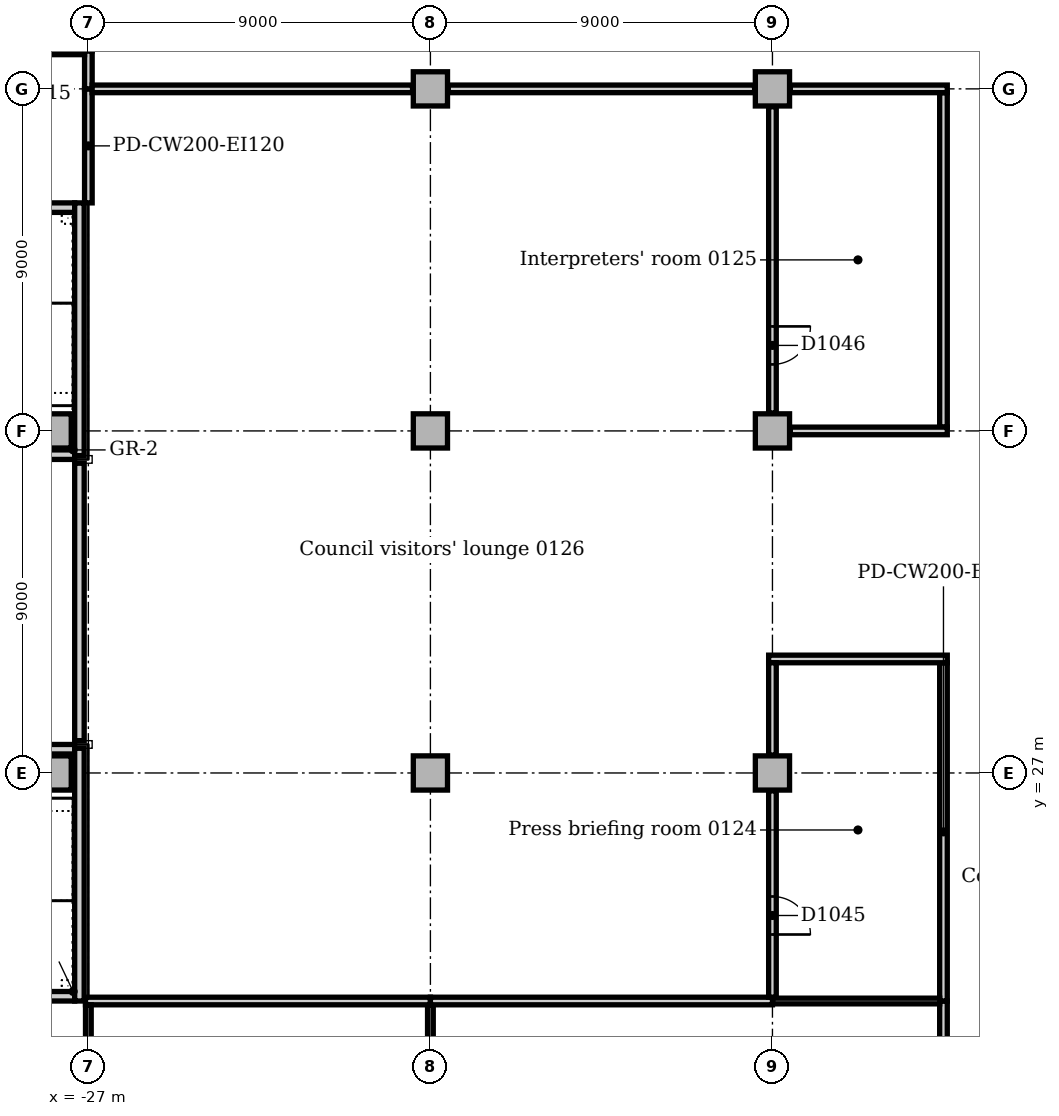
"""IFC4 building model, lengths in metres.
Left out: names, types, materials, properties, quantities, classifications, styles, units other than length and angle.
Written with IfcOpenShell. Run it as: python <this file> out.ifc"""

import sys

from ifc_helpers import new_model, si_unit, direction, frame, frame_2d, origin, origin_2d, place, context, subcontext, project, spatial, rectangle, extrude, element, fill, save


model = new_model("IFC4")
c1 = context("Model", 3, precision=1e-05, world=origin(), true_north=direction((0.0, 1.0)))
c2 = subcontext(c1, "Body", "Model", "MODEL_VIEW")
j1 = project(units=[si_unit("LENGTHUNIT", "METRE"), si_unit("PLANEANGLEUNIT", "RADIAN")], contexts=[c1])
p1 = place(None, origin())
s1 = spatial("IfcSite", under=j1, at=p1, CompositionType="ELEMENT")
p2 = place(p1, origin())
s2 = spatial("IfcBuilding", under=s1, at=p2, CompositionType="ELEMENT")
p3 = place(p2, frame((0.0, 0.0, 6.0)))
s3 = spatial("IfcBuildingStorey", under=s2, at=p3, CompositionType="ELEMENT", Elevation=6.0)
p4 = place(p3, frame((-30.9, 21.125, 0.0), z_axis=(0.0, 0.0, 1.0), x_axis=(1.0, 0.0, 0.0)))
e1 = element("IfcWall", 1, at=p4, inside=s3, PredefinedType="SOLIDWALL", context=c2, shape_type="SweptSolid", body=[
    extrude(rectangle(XDim=3.54, YDim=0.25, at=frame_2d((1.77, 0.0))), origin(), (0.0, 0.0, 1.0), 5.0),
])
p5 = place(p3, frame((-27.36, 27.625, 0.0), z_axis=(0.0, 0.0, 1.0), x_axis=(-1.0, 0.0, 0.0)))
e2 = element("IfcWall", 2, at=p5, inside=s3, PredefinedType="SOLIDWALL", context=c2, shape_type="SweptSolid", body=[
    extrude(rectangle(XDim=3.54, YDim=0.25, at=frame_2d((1.77, 0.0))), origin(), (0.0, 0.0, 1.0), 5.0),
])
p6 = place(p5, frame((1.69, 0.0, 0.0)))
e3 = element("IfcOpeningElement", 3, at=p6, cuts=e2, PredefinedType="OPENING", context=c2, shape_type="SweptSolid", body=[
    extrude(rectangle(XDim=1.1, YDim=2.1, at=frame_2d((0.55, 1.05))), frame((0.0, 0.135, 0.0), z_axis=(0.0, -1.0, 0.0), x_axis=(1.0, 0.0, 0.0)), (0.0, 0.0, 1.0), 0.27),
])
p7 = place(p3, frame((-30.9, 35.375, 0.0), z_axis=(0.0, 0.0, 1.0), x_axis=(1.0, 0.0, 0.0)))
e4 = element("IfcWall", 4, at=p7, inside=s3, PredefinedType="SOLIDWALL", context=c2, shape_type="SweptSolid", body=[
    extrude(rectangle(XDim=3.54, YDim=0.25, at=frame_2d((1.77, 0.0))), origin(), (0.0, 0.0, 1.0), 5.0),
])
p8 = place(p7, frame((0.75, 0.0, 0.0)))
e5 = element("IfcOpeningElement", 5, at=p8, cuts=e4, PredefinedType="OPENING", context=c2, shape_type="SweptSolid", body=[
    extrude(rectangle(XDim=1.1, YDim=2.1, at=frame_2d((0.55, 1.05))), frame((0.0, 0.135, 0.0), z_axis=(0.0, -1.0, 0.0), x_axis=(1.0, 0.0, 0.0)), (0.0, 0.0, 1.0), 0.27),
])
p9 = place(p3, frame((-27.36, 41.875, 0.0), z_axis=(0.0, 0.0, 1.0), x_axis=(-1.0, 0.0, 0.0)))
e6 = element("IfcWall", 6, at=p9, inside=s3, PredefinedType="SOLIDWALL", context=c2, shape_type="SweptSolid", body=[
    extrude(rectangle(XDim=3.54, YDim=0.25, at=frame_2d((1.77, 0.0))), origin(), (0.0, 0.0, 1.0), 5.0),
])
p10 = place(p3, frame((-27.235, 21.0, 0.0), z_axis=(0.0, 0.0, 1.0), x_axis=(0.0, 1.0, 0.0)))
e7 = element("IfcWall", 7, at=p10, inside=s3, PredefinedType="SOLIDWALL", context=c2, shape_type="SweptSolid", body=[
    extrude(rectangle(XDim=6.65, YDim=0.25, at=frame_2d((3.325, 0.0))), origin(), (0.0, 0.0, 1.0), 5.0),
])
p11 = place(p3, frame((-27.235, 27.85, 0.0), z_axis=(0.0, 0.0, 1.0), x_axis=(0.0, 1.0, 0.0)))
e8 = element("IfcWall", 8, at=p11, inside=s3, PredefinedType="SOLIDWALL", context=c2, shape_type="SweptSolid", body=[
    extrude(rectangle(XDim=7.3, YDim=0.25, at=frame_2d((3.65, 0.0))), origin(), (0.0, 0.0, 1.0), 5.0),
])
p12 = place(p3, frame((-27.235, 35.35, 0.0), z_axis=(0.0, 0.0, 1.0), x_axis=(0.0, 1.0, 0.0)))
e9 = element("IfcWall", 9, at=p12, inside=s3, PredefinedType="SOLIDWALL", context=c2, shape_type="SweptSolid", body=[
    extrude(rectangle(XDim=6.65, YDim=0.25, at=frame_2d((3.325, 0.0))), origin(), (0.0, 0.0, 1.0), 5.0),
])
for number, where, z_axis, x_axis in (
    (10, (-27.9, 27.0, 0.0), (0.0, 0.0, 1.0), (1.0, 0.0, 0.0)),
    (11, (-27.9, 36.0, 0.0), (0.0, 0.0, 1.0), (1.0, 0.0, 0.0)),
):
    element("IfcColumn", number, at=place(p3, frame(where, z_axis=z_axis, x_axis=x_axis)), inside=s3, PredefinedType="COLUMN", context=c2, shape_type="SweptSolid", body=[
        extrude(rectangle(XDim=0.9, YDim=0.9, at=origin_2d()), origin(), (0.0, 0.0, 1.0), 5.0),
    ])
for number, where, z_axis, x_axis in (
    (12, (-18.0, 27.0, 0.0), (0.0, 0.0, 1.0), (1.0, 0.0, 0.0)),
    (13, (-18.0, 36.0, 0.0), (0.0, 0.0, 1.0), (1.0, 0.0, 0.0)),
    (14, (-18.0, 45.0, 0.0), (0.0, 0.0, 1.0), (1.0, 0.0, 0.0)),
    (15, (-9.0, 27.0, 0.0), (0.0, 0.0, 1.0), (1.0, 0.0, 0.0)),
    (16, (-9.0, 36.0, 0.0), (0.0, 0.0, 1.0), (1.0, 0.0, 0.0)),
    (17, (-9.0, 45.0, 0.0), (0.0, 0.0, 1.0), (1.0, 0.0, 0.0)),
):
    element("IfcColumn", number, at=place(p3, frame(where, z_axis=z_axis, x_axis=x_axis)), inside=s3, PredefinedType="COLUMN", context=c2, shape_type="SweptSolid", body=[
        extrude(rectangle(XDim=0.9, YDim=0.9, at=origin_2d()), origin(), (0.0, 0.0, 1.0), 4.7),
    ])
p13 = place(p3, frame((-27.0, 42.0, 0.0), z_axis=(0.0, 0.0, 1.0), x_axis=(0.0, 1.0, 0.0)))
e18 = element("IfcWall", 18, at=p13, inside=s3, PredefinedType="PARTITIONING", context=c2, shape_type="SweptSolid", body=[
    extrude(rectangle(XDim=3.0, YDim=0.2, at=frame_2d((1.5, 0.0))), origin(), (0.0, 0.0, 1.0), 4.7),
])
p14 = place(p3, frame((-27.0, 45.0, 0.0), z_axis=(0.0, 0.0, 1.0), x_axis=(0.0, 1.0, 0.0)))
e19 = element("IfcWall", 19, at=p14, inside=s3, PredefinedType="PARTITIONING", context=c2, shape_type="SweptSolid", body=[
    extrude(rectangle(XDim=1.0, YDim=0.2, at=frame_2d((0.5, 0.0))), origin(), (0.0, 0.0, 1.0), 4.7),
])
p15 = place(p3, frame((-36.0, 46.0, 0.0), z_axis=(0.0, 0.0, 1.0), x_axis=(1.0, 0.0, 0.0)))
e20 = element("IfcWall", 20, at=p15, inside=s3, PredefinedType="PARTITIONING", context=c2, shape_type="SweptSolid", body=[
    extrude(rectangle(XDim=8.9, YDim=0.2, at=frame_2d((4.45, 0.0))), origin(), (0.0, 0.0, 1.0), 4.7),
])
p16 = place(p15, frame((4.0, 0.0, 0.0)))
e21 = element("IfcOpeningElement", 21, at=p16, cuts=e20, PredefinedType="OPENING", context=c2, shape_type="SweptSolid", body=[
    extrude(rectangle(XDim=1.0, YDim=2.1, at=frame_2d((0.5, 1.05))), frame((0.0, 0.11, 0.0), z_axis=(0.0, -1.0, 0.0), x_axis=(1.0, 0.0, 0.0)), (0.0, 0.0, 1.0), 0.22),
])
p17 = place(p3, frame((-4.5, 3.7, 0.0), z_axis=(0.0, 0.0, 1.0), x_axis=(0.0, 1.0, 0.0)))
e22 = element("IfcWall", 22, at=p17, inside=s3, PredefinedType="PARTITIONING", context=c2, shape_type="SweptSolid", body=[
    extrude(rectangle(XDim=17.3, YDim=0.2, at=frame_2d((8.65, 0.0))), origin(), (0.0, 0.0, 1.0), 4.7),
])
p18 = place(p17, frame((7.7, 0.0, 0.0)))
e23 = element("IfcOpeningElement", 23, at=p18, cuts=e22, PredefinedType="OPENING", context=c2, shape_type="SweptSolid", body=[
    extrude(rectangle(XDim=1.8, YDim=2.1, at=frame_2d((0.9, 1.05))), frame((0.0, 0.11, 0.0), z_axis=(0.0, -1.0, 0.0), x_axis=(1.0, 0.0, 0.0)), (0.0, 0.0, 1.0), 0.22),
])
p19 = place(p3, frame((-4.5, 21.0, 0.0), z_axis=(0.0, 0.0, 1.0), x_axis=(0.0, 1.0, 0.0)))
e24 = element("IfcWall", 24, at=p19, inside=s3, PredefinedType="PARTITIONING", context=c2, shape_type="SweptSolid", body=[
    extrude(rectangle(XDim=8.9, YDim=0.2, at=frame_2d((4.45, 0.0))), origin(), (0.0, 0.0, 1.0), 4.7),
])
p20 = place(p3, frame((-4.5, 36.1, 0.0), z_axis=(0.0, 0.0, 1.0), x_axis=(0.0, 1.0, 0.0)))
e25 = element("IfcWall", 25, at=p20, inside=s3, PredefinedType="PARTITIONING", context=c2, shape_type="SweptSolid", body=[
    extrude(rectangle(XDim=8.8, YDim=0.2, at=frame_2d((4.4, 0.0))), origin(), (0.0, 0.0, 1.0), 4.7),
])
p21 = place(p3, frame((-18.0, 18.47, 0.0), z_axis=(0.0, 0.0, 1.0), x_axis=(0.0, 1.0, 0.0)))
e26 = element("IfcWall", 26, at=p21, inside=s3, PredefinedType="PARTITIONING", context=c2, shape_type="SweptSolid", body=[
    extrude(rectangle(XDim=2.43, YDim=0.15, at=frame_2d((1.215, 0.0))), origin(), (0.0, 0.0, 1.0), 4.7),
])
p22 = place(p3, frame((-27.075, 21.0, 0.0), z_axis=(0.0, 0.0, 1.0), x_axis=(1.0, 0.0, 0.0)))
e27 = element("IfcWall", 27, at=p22, inside=s3, PredefinedType="PARTITIONING", context=c2, shape_type="SweptSolid", body=[
    extrude(rectangle(XDim=9.075, YDim=0.2, at=frame_2d((4.537, 0.0))), origin(), (0.0, 0.0, 1.0), 4.7),
])
p23 = place(p3, frame((-27.0, 3.7, 0.0), z_axis=(0.0, 0.0, 1.0), x_axis=(0.0, 1.0, 0.0)))
e28 = element("IfcWall", 28, at=p23, inside=s3, PredefinedType="PARTITIONING", context=c2, shape_type="SweptSolid", body=[
    extrude(rectangle(XDim=17.2, YDim=0.15, at=frame_2d((8.6, 0.0))), origin(), (0.0, 0.0, 1.0), 4.7),
])
p24 = place(p3, frame((-9.0, 21.0, 0.0), z_axis=(0.0, 0.0, 1.0), x_axis=(1.0, 0.0, 0.0)))
e29 = element("IfcWall", 29, at=p24, inside=s3, PredefinedType="PARTITIONING", context=c2, shape_type="SweptSolid", body=[
    extrude(rectangle(XDim=4.4, YDim=0.15, at=frame_2d((2.2, 0.0))), origin(), (0.0, 0.0, 1.0), 4.7),
])
p25 = place(p3, frame((-18.0, 21.0, 0.0), z_axis=(0.0, 0.0, 1.0), x_axis=(1.0, 0.0, 0.0)))
e30 = element("IfcWall", 30, at=p25, inside=s3, PredefinedType="PARTITIONING", context=c2, shape_type="SweptSolid", body=[
    extrude(rectangle(XDim=9.0, YDim=0.2, at=frame_2d((4.5, 0.0))), origin(), (0.0, 0.0, 1.0), 4.7),
])
p26 = place(p3, frame((-9.1, 30.0, 0.0), z_axis=(0.0, 0.0, 1.0), x_axis=(1.0, 0.0, 0.0)))
e31 = element("IfcWall", 31, at=p26, inside=s3, PredefinedType="PARTITIONING", context=c2, shape_type="SweptSolid", body=[
    extrude(rectangle(XDim=4.7, YDim=0.2, at=frame_2d((2.35, 0.0))), origin(), (0.0, 0.0, 1.0), 4.7),
])
p27 = place(p3, frame((-9.0, 21.1, 0.0), z_axis=(0.0, 0.0, 1.0), x_axis=(0.0, 1.0, 0.0)))
e32 = element("IfcWall", 32, at=p27, inside=s3, PredefinedType="PARTITIONING", context=c2, shape_type="SweptSolid", body=[
    extrude(rectangle(XDim=5.43, YDim=0.2, at=frame_2d((2.715, 0.0))), origin(), (0.0, 0.0, 1.0), 4.7),
])
p28 = place(p27, frame((1.65, 0.0, 0.0)))
e33 = element("IfcOpeningElement", 33, at=p28, cuts=e32, PredefinedType="OPENING", context=c2, shape_type="SweptSolid", body=[
    extrude(rectangle(XDim=1.0, YDim=2.1, at=frame_2d((0.5, 1.05))), frame((0.0, 0.11, 0.0), z_axis=(0.0, -1.0, 0.0), x_axis=(1.0, 0.0, 0.0)), (0.0, 0.0, 1.0), 0.22),
])
p29 = place(p3, frame((-9.0, 27.47, 0.0), z_axis=(0.0, 0.0, 1.0), x_axis=(0.0, 1.0, 0.0)))
e34 = element("IfcWall", 34, at=p29, inside=s3, PredefinedType="PARTITIONING", context=c2, shape_type="SweptSolid", body=[
    extrude(rectangle(XDim=2.43, YDim=0.2, at=frame_2d((1.215, 0.0))), origin(), (0.0, 0.0, 1.0), 4.7),
])
p30 = place(p3, frame((-8.53, 36.0, 0.0), z_axis=(0.0, 0.0, 1.0), x_axis=(1.0, 0.0, 0.0)))
e35 = element("IfcWall", 35, at=p30, inside=s3, PredefinedType="PARTITIONING", context=c2, shape_type="SweptSolid", body=[
    extrude(rectangle(XDim=4.13, YDim=0.2, at=frame_2d((2.065, 0.0))), origin(), (0.0, 0.0, 1.0), 4.7),
])
p31 = place(p3, frame((-9.0, 36.47, 0.0), z_axis=(0.0, 0.0, 1.0), x_axis=(0.0, 1.0, 0.0)))
e36 = element("IfcWall", 36, at=p31, inside=s3, PredefinedType="PARTITIONING", context=c2, shape_type="SweptSolid", body=[
    extrude(rectangle(XDim=8.06, YDim=0.2, at=frame_2d((4.03, 0.0))), origin(), (0.0, 0.0, 1.0), 4.7),
])
p32 = place(p31, frame((1.28, 0.0, 0.0)))
e37 = element("IfcOpeningElement", 37, at=p32, cuts=e36, PredefinedType="OPENING", context=c2, shape_type="SweptSolid", body=[
    extrude(rectangle(XDim=1.0, YDim=2.1, at=frame_2d((0.5, 1.05))), frame((0.0, 0.11, 0.0), z_axis=(0.0, -1.0, 0.0), x_axis=(1.0, 0.0, 0.0)), (0.0, 0.0, 1.0), 0.22),
])
p33 = place(p3, frame((-8.53, 45.0, 0.0), z_axis=(0.0, 0.0, 1.0), x_axis=(1.0, 0.0, 0.0)))
e38 = element("IfcWall", 38, at=p33, inside=s3, PredefinedType="PARTITIONING", context=c2, shape_type="SweptSolid", body=[
    extrude(rectangle(XDim=4.13, YDim=0.2, at=frame_2d((2.065, 0.0))), origin(), (0.0, 0.0, 1.0), 4.7),
])
p34 = place(p3, frame((-26.9, 45.0, 0.0), z_axis=(0.0, 0.0, 1.0), x_axis=(1.0, 0.0, 0.0)))
e39 = element("IfcWall", 39, at=p34, inside=s3, PredefinedType="PARTITIONING", context=c2, shape_type="SweptSolid", body=[
    extrude(rectangle(XDim=8.43, YDim=0.2, at=frame_2d((4.215, 0.0))), origin(), (0.0, 0.0, 1.0), 4.7),
])
p35 = place(p3, frame((-17.53, 45.0, 0.0), z_axis=(0.0, 0.0, 1.0), x_axis=(1.0, 0.0, 0.0)))
e40 = element("IfcWall", 40, at=p35, inside=s3, PredefinedType="PARTITIONING", context=c2, shape_type="SweptSolid", body=[
    extrude(rectangle(XDim=8.06, YDim=0.2, at=frame_2d((4.03, 0.0))), origin(), (0.0, 0.0, 1.0), 4.7),
])
for number, where, z_axis, x_axis in (
    (41, (-27.36, 27.75, 0.0), (0.0, 0.0, 1.0), (1.0, 0.0, 0.0)),
    (42, (-26.9, 35.25, 0.0), (0.0, 0.0, 1.0), (-1.0, 0.0, 0.0)),
):
    element("IfcWall", number, at=place(p3, frame(where, z_axis=z_axis, x_axis=x_axis)), inside=s3, PredefinedType="SOLIDWALL", context=c2, shape_type="SweptSolid", body=[
        extrude(rectangle(XDim=0.46, YDim=0.2, at=frame_2d((0.23, 0.0))), origin(), (0.0, 0.0, 1.0), 5.0),
    ])
p36 = place(p28, frame((1.0, 0.0, 0.0), z_axis=(0.0, 0.0, 1.0), x_axis=(-1.0, 0.0, 0.0)))
e43 = element("IfcDoor", 43, at=p36, inside=s3, OperationType="SINGLE_SWING_RIGHT", PredefinedType="DOOR", context=c2, shape_type="SweptSolid", body=[
    extrude(rectangle(XDim=1.0, YDim=2.1, at=frame_2d((0.5, 1.05))), frame((0.0, 0.025, 0.0), z_axis=(0.0, -1.0, 0.0), x_axis=(1.0, 0.0, 0.0)), (0.0, 0.0, 1.0), 0.05),
])
fill(e33, e43)
p37 = place(p32, frame((1.0, 0.0, 0.0), z_axis=(0.0, 0.0, 1.0), x_axis=(-1.0, 0.0, 0.0)))
e44 = element("IfcDoor", 44, at=p37, inside=s3, OperationType="SINGLE_SWING_LEFT", PredefinedType="DOOR", context=c2, shape_type="SweptSolid", body=[
    extrude(rectangle(XDim=1.0, YDim=2.1, at=frame_2d((0.5, 1.05))), frame((0.0, 0.025, 0.0), z_axis=(0.0, -1.0, 0.0), x_axis=(1.0, 0.0, 0.0)), (0.0, 0.0, 1.0), 0.05),
])
fill(e37, e44)
save(model, sys.argv[1])
